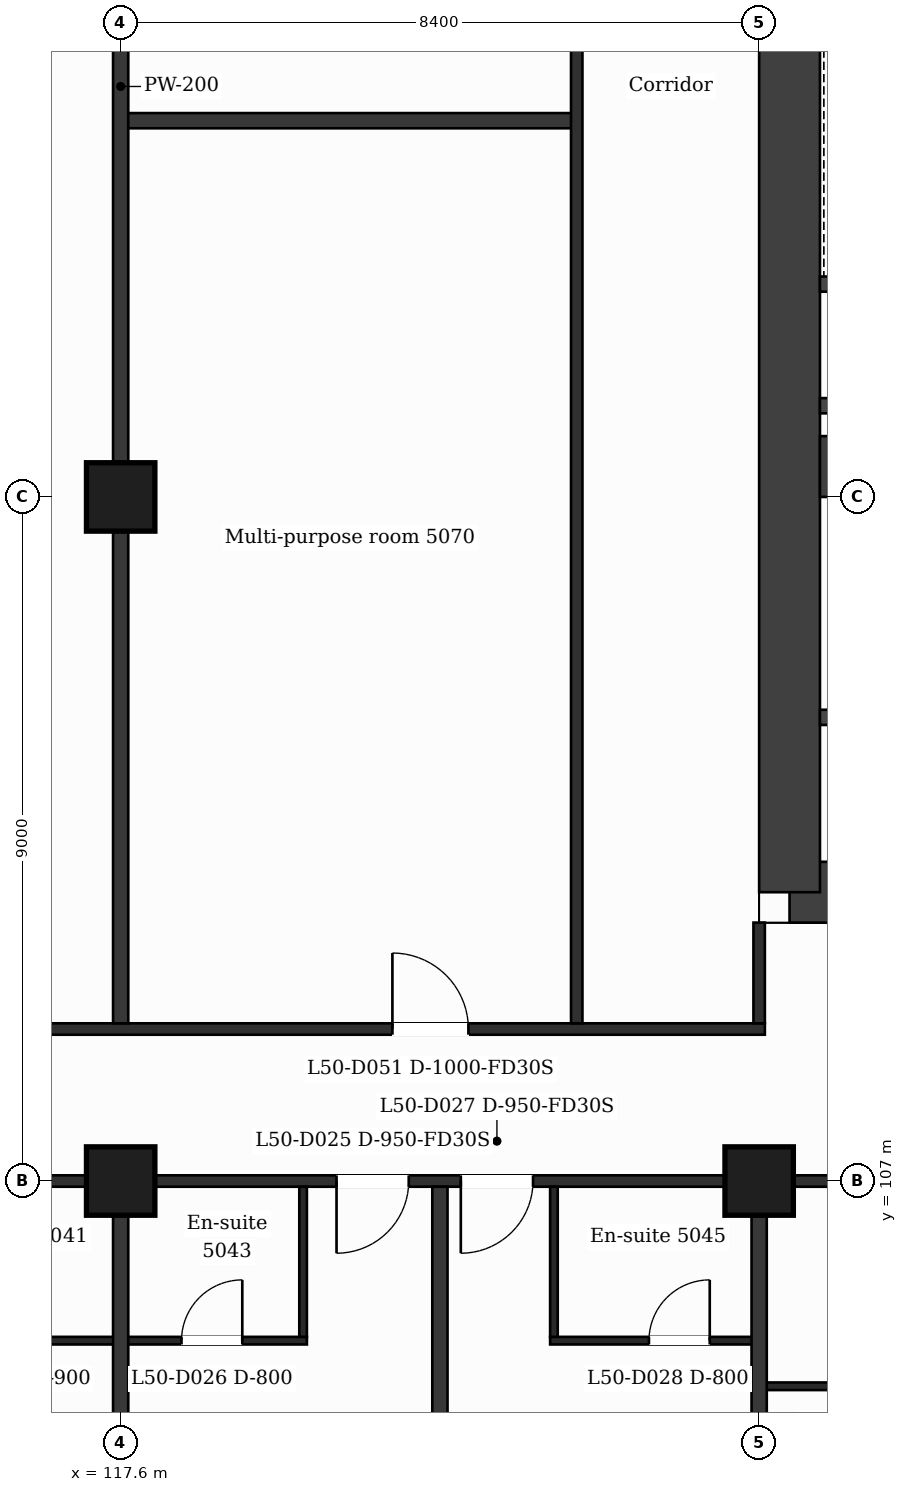
"""IFC4 building model, lengths in metres.
Left out: names, types, materials, properties, quantities, classifications, styles, units other than length and angle.
Written with IfcOpenShell. Run it as: python <this file> out.ifc"""

import sys

from ifc_helpers import new_model, si_unit, direction, frame, frame_2d, origin, origin_2d, place, context, subcontext, project, spatial, rectangle, extrude, element, fill, save


model = new_model("IFC4")
c1 = context("Model", 3, precision=1e-05, world=origin(), true_north=direction((0.0, 1.0)))
c2 = subcontext(c1, "Body", "Model", "MODEL_VIEW")
j1 = project(units=[si_unit("LENGTHUNIT", "METRE"), si_unit("PLANEANGLEUNIT", "RADIAN")], contexts=[c1])
p1 = place(None, origin())
s1 = spatial("IfcSite", under=j1, at=p1, CompositionType="ELEMENT")
p2 = place(p1, origin())
s2 = spatial("IfcBuilding", under=s1, at=p2, CompositionType="ELEMENT")
p3 = place(p2, frame((0.0, 0.0, 209.6)))
s3 = spatial("IfcBuildingStorey", under=s2, at=p3, CompositionType="ELEMENT", Elevation=209.6)
p4 = place(p3, frame((140.673, 110.8, 0.0), z_axis=(0.0, 0.0, 1.0), x_axis=(-1.0, 0.0, 0.0)))
e1 = element("IfcWall", 1, at=p4, inside=s3, PredefinedType="SHEAR", context=c2, shape_type="SweptSolid", body=[
    extrude(rectangle(XDim=14.273, YDim=0.8, at=frame_2d((7.137, 0.0))), origin(), (0.0, 0.0, 1.0), 3.7),
])
p5 = place(p4, frame((6.965, 0.0, 0.0)))
e2 = element("IfcOpeningElement", 2, at=p5, cuts=e1, PredefinedType="OPENING", context=c2, shape_type="SweptSolid", body=[
    extrude(rectangle(XDim=1.4, YDim=2.1, at=frame_2d((0.7, 1.05))), frame((0.0, 0.41, 0.0), z_axis=(0.0, -1.0, 0.0), x_axis=(1.0, 0.0, 0.0)), (0.0, 0.0, 1.0), 0.82),
])
p6 = place(p3, frame((126.4, 110.8, 0.0), z_axis=(0.0, 0.0, 1.0), x_axis=(0.0, 1.0, 0.0)))
e3 = element("IfcWall", 3, at=p6, inside=s3, PredefinedType="SHEAR", context=c2, shape_type="SweptSolid", body=[
    extrude(rectangle(XDim=21.2, YDim=0.8, at=frame_2d((10.6, 0.0))), origin(), (0.0, 0.0, 1.0), 3.7),
])
p7 = place(p6, frame((11.95, 0.0, 0.0)))
e4 = element("IfcOpeningElement", 4, at=p7, cuts=e3, PredefinedType="OPENING", context=c2, shape_type="SweptSolid", body=[
    extrude(rectangle(XDim=1.4, YDim=2.1, at=frame_2d((0.7, 1.05))), frame((0.0, 0.41, 0.0), z_axis=(0.0, -1.0, 0.0), x_axis=(1.0, 0.0, 0.0)), (0.0, 0.0, 1.0), 0.82),
])
p8 = place(p3, frame((126.8, 116.4, 0.0), z_axis=(0.0, 0.0, 1.0), x_axis=(1.0, 0.0, 0.0)))
e5 = element("IfcWall", 5, at=p8, inside=s3, PredefinedType="SHEAR", context=c2, shape_type="SweptSolid", body=[
    extrude(rectangle(XDim=5.3, YDim=0.8, at=frame_2d((2.65, 0.0))), origin(), (0.0, 0.0, 1.0), 3.7),
])
for number, where, z_axis, x_axis in (
    (6, (117.6, 107.0, 0.0), (0.0, 0.0, 1.0), (1.0, 0.0, 0.0)),
    (7, (126.0, 107.0, 0.0), (0.0, 0.0, 1.0), (1.0, 0.0, 0.0)),
    (8, (117.6, 116.0, 0.0), (0.0, 0.0, 1.0), (1.0, 0.0, 0.0)),
):
    element("IfcColumn", number, at=place(p3, frame(where, z_axis=z_axis, x_axis=x_axis)), inside=s3, PredefinedType="COLUMN", context=c2, shape_type="SweptSolid", body=[
        extrude(rectangle(XDim=0.9, YDim=0.9, at=origin_2d()), origin(), (0.0, 0.0, 1.0), 3.7),
    ])
p9 = place(p3, frame((126.0, 104.3, 0.0), z_axis=(0.0, 0.0, 1.0), x_axis=(1.0, 0.0, 0.0)))
e9 = element("IfcWall", 9, at=p9, inside=s3, PredefinedType="PARTITIONING", context=c2, shape_type="SweptSolid", body=[
    extrude(rectangle(XDim=2.15, YDim=0.1, at=frame_2d((1.075, 0.0))), origin(), (0.0, 0.0, 1.0), 3.38),
])
p10 = place(p3, frame((114.85, 104.9, 0.0), z_axis=(0.0, 0.0, 1.0), x_axis=(1.0, 0.0, 0.0)))
e10 = element("IfcWall", 10, at=p10, inside=s3, PredefinedType="PARTITIONING", context=c2, shape_type="SweptSolid", body=[
    extrude(rectangle(XDim=5.2, YDim=0.1, at=frame_2d((2.6, 0.0))), origin(), (0.0, 0.0, 1.0), 3.38),
])
p11 = place(p10, frame((0.84, 0.0, 0.0)))
e11 = element("IfcOpeningElement", 11, at=p11, cuts=e10, PredefinedType="OPENING", context=c2, shape_type="SweptSolid", body=[
    extrude(rectangle(XDim=0.9, YDim=2.1, at=frame_2d((0.45, 1.05))), frame((0.0, 0.06, 0.0), z_axis=(0.0, -1.0, 0.0), x_axis=(1.0, 0.0, 0.0)), (0.0, 0.0, 1.0), 0.12),
])
p12 = place(p10, frame((3.55, 0.0, 0.0)))
e12 = element("IfcOpeningElement", 12, at=p12, cuts=e10, PredefinedType="OPENING", context=c2, shape_type="SweptSolid", body=[
    extrude(rectangle(XDim=0.8, YDim=2.1, at=frame_2d((0.4, 1.05))), frame((0.0, 0.06, 0.0), z_axis=(0.0, -1.0, 0.0), x_axis=(1.0, 0.0, 0.0)), (0.0, 0.0, 1.0), 0.12),
])
p13 = place(p3, frame((123.25, 104.9, 0.0), z_axis=(0.0, 0.0, 1.0), x_axis=(1.0, 0.0, 0.0)))
e13 = element("IfcWall", 13, at=p13, inside=s3, PredefinedType="PARTITIONING", context=c2, shape_type="SweptSolid", body=[
    extrude(rectangle(XDim=2.75, YDim=0.1, at=frame_2d((1.375, 0.0))), origin(), (0.0, 0.0, 1.0), 3.38),
])
p14 = place(p13, frame((1.3, 0.0, 0.0)))
e14 = element("IfcOpeningElement", 14, at=p14, cuts=e13, PredefinedType="OPENING", context=c2, shape_type="SweptSolid", body=[
    extrude(rectangle(XDim=0.8, YDim=2.1, at=frame_2d((0.4, 1.05))), frame((0.0, 0.06, 0.0), z_axis=(0.0, -1.0, 0.0), x_axis=(1.0, 0.0, 0.0)), (0.0, 0.0, 1.0), 0.12),
])
p15 = place(p3, frame((87.018, 107.0, 0.0), z_axis=(0.0, 0.0, 1.0), x_axis=(1.0, 0.0, 0.0)))
e15 = element("IfcWall", 15, at=p15, inside=s3, PredefinedType="PARTITIONING", context=c2, shape_type="SweptSolid", body=[
    extrude(rectangle(XDim=52.765, YDim=0.15, at=frame_2d((26.382, 0.0))), origin(), (0.0, 0.0, 1.0), 3.38),
])
p16 = place(p15, frame((1.276, 0.0, 0.0)))
e16 = element("IfcOpeningElement", 16, at=p16, cuts=e15, PredefinedType="OPENING", context=c2, shape_type="SweptSolid", body=[
    extrude(rectangle(XDim=0.95, YDim=2.1, at=frame_2d((0.475, 1.05))), frame((0.0, 0.085, 0.0), z_axis=(0.0, -1.0, 0.0), x_axis=(1.0, 0.0, 0.0)), (0.0, 0.0, 1.0), 0.17),
])
p17 = place(p15, frame((6.034, 0.0, 0.0)))
e17 = element("IfcOpeningElement", 17, at=p17, cuts=e15, PredefinedType="OPENING", context=c2, shape_type="SweptSolid", body=[
    extrude(rectangle(XDim=0.95, YDim=2.1, at=frame_2d((0.475, 1.05))), frame((0.0, 0.085, 0.0), z_axis=(0.0, -1.0, 0.0), x_axis=(1.0, 0.0, 0.0)), (0.0, 0.0, 1.0), 0.17),
])
p18 = place(p15, frame((15.445, 0.0, 0.0)))
e18 = element("IfcOpeningElement", 18, at=p18, cuts=e15, PredefinedType="OPENING", context=c2, shape_type="SweptSolid", body=[
    extrude(rectangle(XDim=0.95, YDim=2.1, at=frame_2d((0.475, 1.05))), frame((0.0, 0.085, 0.0), z_axis=(0.0, -1.0, 0.0), x_axis=(1.0, 0.0, 0.0)), (0.0, 0.0, 1.0), 0.17),
])
p19 = place(p15, frame((18.369, 0.0, 0.0)))
e19 = element("IfcOpeningElement", 19, at=p19, cuts=e15, PredefinedType="OPENING", context=c2, shape_type="SweptSolid", body=[
    extrude(rectangle(XDim=0.95, YDim=2.1, at=frame_2d((0.475, 1.05))), frame((0.0, 0.085, 0.0), z_axis=(0.0, -1.0, 0.0), x_axis=(1.0, 0.0, 0.0)), (0.0, 0.0, 1.0), 0.17),
])
p20 = place(p15, frame((24.519, 0.0, 0.0)))
e20 = element("IfcOpeningElement", 20, at=p20, cuts=e15, PredefinedType="OPENING", context=c2, shape_type="SweptSolid", body=[
    extrude(rectangle(XDim=0.95, YDim=2.1, at=frame_2d((0.475, 1.05))), frame((0.0, 0.085, 0.0), z_axis=(0.0, -1.0, 0.0), x_axis=(1.0, 0.0, 0.0)), (0.0, 0.0, 1.0), 0.17),
])
p21 = place(p15, frame((26.632, 0.0, 0.0)))
e21 = element("IfcOpeningElement", 21, at=p21, cuts=e15, PredefinedType="OPENING", context=c2, shape_type="SweptSolid", body=[
    extrude(rectangle(XDim=1.0, YDim=2.1, at=frame_2d((0.5, 1.05))), frame((0.0, 0.085, 0.0), z_axis=(0.0, -1.0, 0.0), x_axis=(1.0, 0.0, 0.0)), (0.0, 0.0, 1.0), 0.17),
])
p22 = place(p15, frame((33.422, 0.0, 0.0)))
e22 = element("IfcOpeningElement", 22, at=p22, cuts=e15, PredefinedType="OPENING", context=c2, shape_type="SweptSolid", body=[
    extrude(rectangle(XDim=0.95, YDim=2.1, at=frame_2d((0.475, 1.05))), frame((0.0, 0.085, 0.0), z_axis=(0.0, -1.0, 0.0), x_axis=(1.0, 0.0, 0.0)), (0.0, 0.0, 1.0), 0.17),
])
p23 = place(p15, frame((35.057, 0.0, 0.0)))
e23 = element("IfcOpeningElement", 23, at=p23, cuts=e15, PredefinedType="OPENING", context=c2, shape_type="SweptSolid", body=[
    extrude(rectangle(XDim=0.95, YDim=2.1, at=frame_2d((0.475, 1.05))), frame((0.0, 0.085, 0.0), z_axis=(0.0, -1.0, 0.0), x_axis=(1.0, 0.0, 0.0)), (0.0, 0.0, 1.0), 0.17),
])
p24 = place(p15, frame((44.532, 0.0, 0.0)))
e24 = element("IfcOpeningElement", 24, at=p24, cuts=e15, PredefinedType="OPENING", context=c2, shape_type="SweptSolid", body=[
    extrude(rectangle(XDim=1.0, YDim=2.1, at=frame_2d((0.5, 1.05))), frame((0.0, 0.085, 0.0), z_axis=(0.0, -1.0, 0.0), x_axis=(1.0, 0.0, 0.0)), (0.0, 0.0, 1.0), 0.17),
])
p25 = place(p15, frame((48.249, 0.0, 0.0)))
e25 = element("IfcOpeningElement", 25, at=p25, cuts=e15, PredefinedType="OPENING", context=c2, shape_type="SweptSolid", body=[
    extrude(rectangle(XDim=0.95, YDim=2.1, at=frame_2d((0.475, 1.05))), frame((0.0, 0.085, 0.0), z_axis=(0.0, -1.0, 0.0), x_axis=(1.0, 0.0, 0.0)), (0.0, 0.0, 1.0), 0.17),
])
p26 = place(p3, frame((100.725, 109.0, 0.0), z_axis=(0.0, 0.0, 1.0), x_axis=(1.0, 0.0, 0.0)))
e26 = element("IfcWall", 26, at=p26, inside=s3, PredefinedType="PARTITIONING", context=c2, shape_type="SweptSolid", body=[
    extrude(rectangle(XDim=25.35, YDim=0.15, at=frame_2d((12.675, 0.0))), origin(), (0.0, 0.0, 1.0), 3.38),
])
p27 = place(p26, frame((6.15, 0.0, 0.0)))
e27 = element("IfcOpeningElement", 27, at=p27, cuts=e26, PredefinedType="OPENING", context=c2, shape_type="SweptSolid", body=[
    extrude(rectangle(XDim=1.0, YDim=2.1, at=frame_2d((0.5, 1.05))), frame((0.0, 0.085, 0.0), z_axis=(0.0, -1.0, 0.0), x_axis=(1.0, 0.0, 0.0)), (0.0, 0.0, 1.0), 0.17),
])
p28 = place(p26, frame((3.475, 0.0, 0.0)))
e28 = element("IfcOpeningElement", 28, at=p28, cuts=e26, PredefinedType="OPENING", context=c2, shape_type="SweptSolid", body=[
    extrude(rectangle(XDim=1.0, YDim=2.1, at=frame_2d((0.5, 1.05))), frame((0.0, 0.085, 0.0), z_axis=(0.0, -1.0, 0.0), x_axis=(1.0, 0.0, 0.0)), (0.0, 0.0, 1.0), 0.17),
])
p29 = place(p26, frame((12.175, 0.0, 0.0)))
e29 = element("IfcOpeningElement", 29, at=p29, cuts=e26, PredefinedType="OPENING", context=c2, shape_type="SweptSolid", body=[
    extrude(rectangle(XDim=1.0, YDim=2.1, at=frame_2d((0.5, 1.05))), frame((0.0, 0.085, 0.0), z_axis=(0.0, -1.0, 0.0), x_axis=(1.0, 0.0, 0.0)), (0.0, 0.0, 1.0), 0.17),
])
p30 = place(p26, frame((20.45, 0.0, 0.0)))
e30 = element("IfcOpeningElement", 30, at=p30, cuts=e26, PredefinedType="OPENING", context=c2, shape_type="SweptSolid", body=[
    extrude(rectangle(XDim=1.0, YDim=2.1, at=frame_2d((0.5, 1.05))), frame((0.0, 0.085, 0.0), z_axis=(0.0, -1.0, 0.0), x_axis=(1.0, 0.0, 0.0)), (0.0, 0.0, 1.0), 0.17),
])
p31 = place(p3, frame((126.8, 113.1, 0.0), z_axis=(0.0, 0.0, 1.0), x_axis=(1.0, 0.0, 0.0)))
e31 = element("IfcWall", 31, at=p31, inside=s3, PredefinedType="PARTITIONING", context=c2, shape_type="SweptSolid", body=[
    extrude(rectangle(XDim=4.873, YDim=0.2, at=frame_2d((2.437, 0.0))), origin(), (0.0, 0.0, 1.0), 3.38),
])
p32 = place(p31, frame((1.936, 0.0, 0.0)))
e32 = element("IfcOpeningElement", 32, at=p32, cuts=e31, PredefinedType="OPENING", context=c2, shape_type="SweptSolid", body=[
    extrude(rectangle(XDim=0.9, YDim=2.1, at=frame_2d((0.45, 1.05))), frame((0.0, 0.11, 0.0), z_axis=(0.0, -1.0, 0.0), x_axis=(1.0, 0.0, 0.0)), (0.0, 0.0, 1.0), 0.22),
])
for number, where, z_axis, x_axis in (
    (33, (126.8, 117.2, 0.0), (0.0, 0.0, 1.0), (1.0, 0.0, 0.0)),
    (34, (126.8, 118.8, 0.0), (0.0, 0.0, 1.0), (1.0, 0.0, 0.0)),
):
    element("IfcWall", number, at=place(p3, frame(where, z_axis=z_axis, x_axis=x_axis)), inside=s3, PredefinedType="PARTITIONING", context=c2, shape_type="SweptSolid", body=[
        extrude(rectangle(XDim=4.773, YDim=0.2, at=frame_2d((2.386, 0.0))), origin(), (0.0, 0.0, 1.0), 3.38),
    ])
p33 = place(p3, frame((117.6, 120.95, 0.0), z_axis=(0.0, 0.0, 1.0), x_axis=(1.0, 0.0, 0.0)))
e35 = element("IfcWall", 35, at=p33, inside=s3, PredefinedType="PARTITIONING", context=c2, shape_type="SweptSolid", body=[
    extrude(rectangle(XDim=6.0, YDim=0.2, at=frame_2d((3.0, 0.0))), origin(), (0.0, 0.0, 1.0), 3.38),
])
p34 = place(p3, frame((117.6, 99.79, 0.0), z_axis=(0.0, 0.0, 1.0), x_axis=(0.0, 1.0, 0.0)))
e36 = element("IfcWall", 36, at=p34, inside=s3, PredefinedType="PARTITIONING", context=c2, shape_type="SweptSolid", body=[
    extrude(rectangle(XDim=7.135, YDim=0.2, at=frame_2d((3.567, 0.0))), origin(), (0.0, 0.0, 1.0), 3.38),
])
p35 = place(p3, frame((117.6, 109.075, 0.0), z_axis=(0.0, 0.0, 1.0), x_axis=(0.0, 1.0, 0.0)))
e37 = element("IfcWall", 37, at=p35, inside=s3, PredefinedType="PARTITIONING", context=c2, shape_type="SweptSolid", body=[
    extrude(rectangle(XDim=24.65, YDim=0.2, at=frame_2d((12.325, 0.0))), origin(), (0.0, 0.0, 1.0), 3.38),
])
p36 = place(p3, frame((120.0, 104.95, 0.0), z_axis=(0.0, 0.0, 1.0), x_axis=(0.0, 1.0, 0.0)))
e38 = element("IfcWall", 38, at=p36, inside=s3, PredefinedType="PARTITIONING", context=c2, shape_type="SweptSolid", body=[
    extrude(rectangle(XDim=1.975, YDim=0.1, at=frame_2d((0.988, 0.0))), origin(), (0.0, 0.0, 1.0), 3.38),
])
p37 = place(p3, frame((121.8, 99.79, 0.0), z_axis=(0.0, 0.0, 1.0), x_axis=(0.0, 1.0, 0.0)))
e39 = element("IfcWall", 39, at=p37, inside=s3, PredefinedType="PARTITIONING", context=c2, shape_type="SweptSolid", body=[
    extrude(rectangle(XDim=7.135, YDim=0.2, at=frame_2d((3.567, 0.0))), origin(), (0.0, 0.0, 1.0), 3.38),
])
p38 = place(p3, frame((123.3, 104.95, 0.0), z_axis=(0.0, 0.0, 1.0), x_axis=(0.0, 1.0, 0.0)))
e40 = element("IfcWall", 40, at=p38, inside=s3, PredefinedType="PARTITIONING", context=c2, shape_type="SweptSolid", body=[
    extrude(rectangle(XDim=1.975, YDim=0.1, at=frame_2d((0.988, 0.0))), origin(), (0.0, 0.0, 1.0), 3.38),
])
p39 = place(p3, frame((123.6, 109.075, 0.0), z_axis=(0.0, 0.0, 1.0), x_axis=(0.0, 1.0, 0.0)))
e41 = element("IfcWall", 41, at=p39, inside=s3, PredefinedType="PARTITIONING", context=c2, shape_type="SweptSolid", body=[
    extrude(rectangle(XDim=24.65, YDim=0.15, at=frame_2d((12.325, 0.0))), origin(), (0.0, 0.0, 1.0), 3.38),
])
p40 = place(p3, frame((126.0, 99.79, 0.0), z_axis=(0.0, 0.0, 1.0), x_axis=(0.0, 1.0, 0.0)))
e42 = element("IfcWall", 42, at=p40, inside=s3, PredefinedType="PARTITIONING", context=c2, shape_type="SweptSolid", body=[
    extrude(rectangle(XDim=7.135, YDim=0.2, at=frame_2d((3.567, 0.0))), origin(), (0.0, 0.0, 1.0), 3.38),
])
p41 = place(p3, frame((126.0, 109.075, 0.0), z_axis=(0.0, 0.0, 1.0), x_axis=(0.0, 1.0, 0.0)))
e43 = element("IfcWall", 43, at=p41, inside=s3, PredefinedType="PARTITIONING", context=c2, shape_type="SweptSolid", body=[
    extrude(rectangle(XDim=1.325, YDim=0.15, at=frame_2d((0.663, 0.0))), origin(), (0.0, 0.0, 1.0), 3.38),
])
p42 = place(p22, origin())
e44 = element("IfcDoor", 44, at=p42, inside=s3, OperationType="SINGLE_SWING_LEFT", PredefinedType="DOOR", context=c2, shape_type="SweptSolid", body=[
    extrude(rectangle(XDim=0.95, YDim=2.1, at=frame_2d((0.475, 1.05))), frame((0.0, 0.025, 0.0), z_axis=(0.0, -1.0, 0.0), x_axis=(1.0, 0.0, 0.0)), (0.0, 0.0, 1.0), 0.05),
])
fill(e22, e44)
p43 = place(p12, origin())
e45 = element("IfcDoor", 45, at=p43, inside=s3, OperationType="SINGLE_SWING_RIGHT", PredefinedType="DOOR", context=c2, shape_type="SweptSolid", body=[
    extrude(rectangle(XDim=0.8, YDim=2.1, at=frame_2d((0.4, 1.05))), frame((0.0, 0.025, 0.0), z_axis=(0.0, -1.0, 0.0), x_axis=(1.0, 0.0, 0.0)), (0.0, 0.0, 1.0), 0.05),
])
fill(e12, e45)
p44 = place(p23, origin())
e46 = element("IfcDoor", 46, at=p44, inside=s3, OperationType="SINGLE_SWING_LEFT", PredefinedType="DOOR", context=c2, shape_type="SweptSolid", body=[
    extrude(rectangle(XDim=0.95, YDim=2.1, at=frame_2d((0.475, 1.05))), frame((0.0, 0.025, 0.0), z_axis=(0.0, -1.0, 0.0), x_axis=(1.0, 0.0, 0.0)), (0.0, 0.0, 1.0), 0.05),
])
fill(e23, e46)
p45 = place(p14, origin())
e47 = element("IfcDoor", 47, at=p45, inside=s3, OperationType="SINGLE_SWING_RIGHT", PredefinedType="DOOR", context=c2, shape_type="SweptSolid", body=[
    extrude(rectangle(XDim=0.8, YDim=2.1, at=frame_2d((0.4, 1.05))), frame((0.0, 0.025, 0.0), z_axis=(0.0, -1.0, 0.0), x_axis=(1.0, 0.0, 0.0)), (0.0, 0.0, 1.0), 0.05),
])
fill(e14, e47)
p46 = place(p30, origin())
e48 = element("IfcDoor", 48, at=p46, inside=s3, OperationType="SINGLE_SWING_LEFT", PredefinedType="DOOR", context=c2, shape_type="SweptSolid", body=[
    extrude(rectangle(XDim=1.0, YDim=2.1, at=frame_2d((0.5, 1.05))), frame((0.0, 0.025, 0.0), z_axis=(0.0, -1.0, 0.0), x_axis=(1.0, 0.0, 0.0)), (0.0, 0.0, 1.0), 0.05),
])
fill(e30, e48)
save(model, sys.argv[1])
